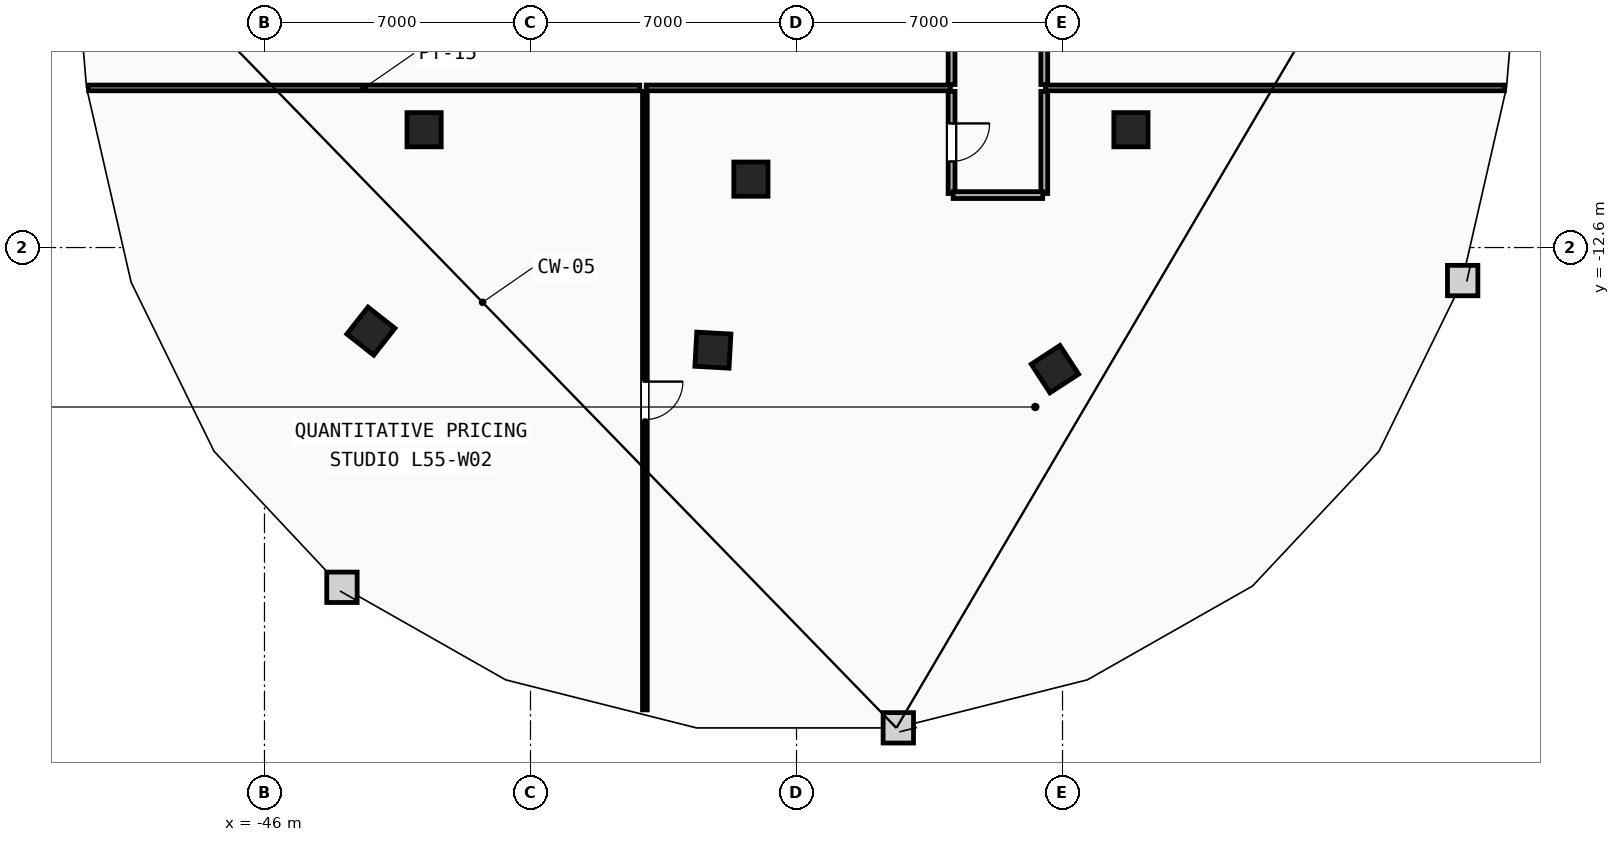
"""IFC4 building model, lengths in metres.
Left out: names, types, materials, properties, quantities, classifications, styles, units other than length and angle.
Written with IfcOpenShell. Run it as: python <this file> out.ifc"""

import sys

from ifc_helpers import new_model, si_unit, direction, frame, frame_2d, origin, origin_2d, place, context, subcontext, project, spatial, rectangle, extrude, element, fill, save


model = new_model("IFC4")
c1 = context("Model", 3, precision=1e-05, world=origin(), true_north=direction((0.0, 1.0)))
c2 = subcontext(c1, "Body", "Model", "MODEL_VIEW")
j1 = project(units=[si_unit("LENGTHUNIT", "METRE"), si_unit("PLANEANGLEUNIT", "RADIAN")], contexts=[c1])
p1 = place(None, origin())
s1 = spatial("IfcSite", under=j1, at=p1, CompositionType="ELEMENT")
p2 = place(p1, origin())
s2 = spatial("IfcBuilding", under=s1, at=p2, CompositionType="ELEMENT")
p3 = place(p2, frame((0.0, 0.0, 209.8)))
s3 = spatial("IfcBuildingStorey", under=s2, at=p3, CompositionType="ELEMENT", Elevation=209.8)
for number, where, z_axis, x_axis in (
    (1, (-41.8, -9.5, 0.0), (0.0, 0.0, 1.0), (1.0, 0.0, 0.0)),
    (2, (-33.2, -10.8, 0.0), (0.0, 0.0, 1.0), (1.0, 0.0, 0.0)),
    (3, (-23.2, -9.5, 0.0), (0.0, 0.0, 1.0), (1.0, 0.0, 0.0)),
    (4, (-43.2, -14.8, 0.0), (0.0, 0.0, 1.0), (0.786, -0.618, 0.0)),
    (5, (-34.2, -15.3, 0.0), (0.0, 0.0, 1.0), (0.998, -0.055, 0.0)),
    (6, (-25.2, -15.8, 0.0), (0.0, 0.0, 1.0), (0.838, 0.546, 0.0)),
):
    element("IfcColumn", number, at=place(p3, frame(where, z_axis=z_axis, x_axis=x_axis)), inside=s3, PredefinedType="COLUMN", context=c2, shape_type="SweptSolid", body=[
        extrude(rectangle(XDim=0.9, YDim=0.9, at=origin_2d()), origin(), (0.0, 0.0, 1.0), 3.6),
    ])
p4 = place(p3, frame((-50.63, -8.4, 0.0), z_axis=(0.0, 0.0, 1.0), x_axis=(1.0, 0.0, 0.0)))
e7 = element("IfcWall", 7, at=p4, inside=s3, PredefinedType="PARTITIONING", context=c2, shape_type="SweptSolid", body=[
    extrude(rectangle(XDim=14.505, YDim=0.15, at=frame_2d((7.252, 0.0))), origin(), (0.0, 0.0, 1.0), 3.34),
])
p5 = place(p3, frame((-35.955, -8.4, 0.0), z_axis=(0.0, 0.0, 1.0), x_axis=(1.0, 0.0, 0.0)))
e8 = element("IfcWall", 8, at=p5, inside=s3, PredefinedType="PARTITIONING", context=c2, shape_type="SweptSolid", body=[
    extrude(rectangle(XDim=8.005, YDim=0.15, at=frame_2d((4.002, 0.0))), origin(), (0.0, 0.0, 1.0), 3.34),
])
p6 = place(p3, frame((-25.45, -8.4, 0.0), z_axis=(0.0, 0.0, 1.0), x_axis=(1.0, 0.0, 0.0)))
e9 = element("IfcWall", 9, at=p6, inside=s3, PredefinedType="PARTITIONING", context=c2, shape_type="SweptSolid", body=[
    extrude(rectangle(XDim=12.08, YDim=0.15, at=frame_2d((6.04, 0.0))), origin(), (0.0, 0.0, 1.0), 3.34),
])
p7 = place(p3, frame((-27.92, -8.49, 0.0), z_axis=(0.0, 0.0, 1.0), x_axis=(0.0, -1.0, 0.0)))
e10 = element("IfcWall", 10, at=p7, inside=s3, PredefinedType="PARTITIONING", context=c2, shape_type="SweptSolid", body=[
    extrude(rectangle(XDim=2.688, YDim=0.18, at=frame_2d((1.344, 0.0))), origin(), (0.0, 0.0, 1.0), 3.34),
])
p8 = place(p7, frame((0.844, 0.0, 0.0)))
e11 = element("IfcOpeningElement", 11, at=p8, cuts=e10, PredefinedType="OPENING", context=c2, shape_type="SweptSolid", body=[
    extrude(rectangle(XDim=1.0, YDim=2.15, at=frame_2d((0.5, 1.075))), frame((0.0, 0.1, 0.0), z_axis=(0.0, -1.0, 0.0), x_axis=(1.0, 0.0, 0.0)), (0.0, 0.0, 1.0), 0.2),
])
p9 = place(p3, frame((-25.48, -11.178, 0.0), z_axis=(0.0, 0.0, 1.0), x_axis=(0.0, 1.0, 0.0)))
e12 = element("IfcWall", 12, at=p9, inside=s3, PredefinedType="PARTITIONING", context=c2, shape_type="SweptSolid", body=[
    extrude(rectangle(XDim=2.688, YDim=0.18, at=frame_2d((1.344, 0.0))), origin(), (0.0, 0.0, 1.0), 3.34),
])
p10 = place(p3, frame((-27.878, -11.22, 0.0), z_axis=(0.0, 0.0, 1.0), x_axis=(1.0, 0.0, 0.0)))
e13 = element("IfcWall", 13, at=p10, inside=s3, PredefinedType="PARTITIONING", context=c2, shape_type="SweptSolid", body=[
    extrude(rectangle(XDim=2.357, YDim=0.18, at=frame_2d((1.178, 0.0))), origin(), (0.0, 0.0, 1.0), 3.34),
])
p11 = place(p3, frame((-27.92, -0.45, 0.0), z_axis=(0.0, 0.0, 1.0), x_axis=(0.0, -1.0, 0.0)))
e14 = element("IfcWall", 14, at=p11, inside=s3, PredefinedType="PARTITIONING", context=c2, shape_type="SweptSolid", body=[
    extrude(rectangle(XDim=7.86, YDim=0.18, at=frame_2d((3.93, 0.0))), origin(), (0.0, 0.0, 1.0), 3.34),
])
p12 = place(p11, frame((3.43, 0.0, 0.0)))
e15 = element("IfcOpeningElement", 15, at=p12, cuts=e14, PredefinedType="OPENING", context=c2, shape_type="SweptSolid", body=[
    extrude(rectangle(XDim=1.0, YDim=2.15, at=frame_2d((0.5, 1.075))), frame((0.0, 0.1, 0.0), z_axis=(0.0, -1.0, 0.0), x_axis=(1.0, 0.0, 0.0)), (0.0, 0.0, 1.0), 0.2),
])
p13 = place(p3, frame((-25.48, -8.31, 0.0), z_axis=(0.0, 0.0, 1.0), x_axis=(0.0, 1.0, 0.0)))
e16 = element("IfcWall", 16, at=p13, inside=s3, PredefinedType="PARTITIONING", context=c2, shape_type="SweptSolid", body=[
    extrude(rectangle(XDim=7.86, YDim=0.18, at=frame_2d((3.93, 0.0))), origin(), (0.0, 0.0, 1.0), 3.34),
])
p14 = place(p3, frame((-35.99, -8.49, 0.0), z_axis=(0.0, 0.0, 1.0), x_axis=(0.0, -1.0, 0.0)))
e17 = element("IfcWall", 17, at=p14, inside=s3, PredefinedType="PARTITIONING", context=c2, shape_type="SweptSolid", body=[
    extrude(rectangle(XDim=16.275, YDim=0.125, at=frame_2d((8.137, 0.0))), origin(), (0.0, 0.0, 1.0), 3.34),
])
p15 = place(p14, frame((7.637, 0.0, 0.0)))
e18 = element("IfcOpeningElement", 18, at=p15, cuts=e17, PredefinedType="OPENING", context=c2, shape_type="SweptSolid", body=[
    extrude(rectangle(XDim=1.0, YDim=2.15, at=frame_2d((0.5, 1.075))), frame((0.0, 0.073, 0.0), z_axis=(0.0, -1.0, 0.0), x_axis=(1.0, 0.0, 0.0)), (0.0, 0.0, 1.0), 0.145),
])
p16 = place(p15, origin())
e19 = element("IfcDoor", 19, at=p16, inside=s3, OperationType="SINGLE_SWING_LEFT", PredefinedType="DOOR", context=c2, shape_type="SweptSolid", body=[
    extrude(rectangle(XDim=1.0, YDim=2.15, at=frame_2d((0.5, 1.075))), frame((0.0, 0.025, 0.0), z_axis=(0.0, -1.0, 0.0), x_axis=(1.0, 0.0, 0.0)), (0.0, 0.0, 1.0), 0.05),
])
fill(e18, e19)
p17 = place(p8, origin())
e20 = element("IfcDoor", 20, at=p17, inside=s3, OperationType="SINGLE_SWING_LEFT", PredefinedType="DOOR", context=c2, shape_type="SweptSolid", body=[
    extrude(rectangle(XDim=1.0, YDim=2.15, at=frame_2d((0.5, 1.075))), frame((0.0, 0.025, 0.0), z_axis=(0.0, -1.0, 0.0), x_axis=(1.0, 0.0, 0.0)), (0.0, 0.0, 1.0), 0.05),
])
fill(e11, e20)
save(model, sys.argv[1])
